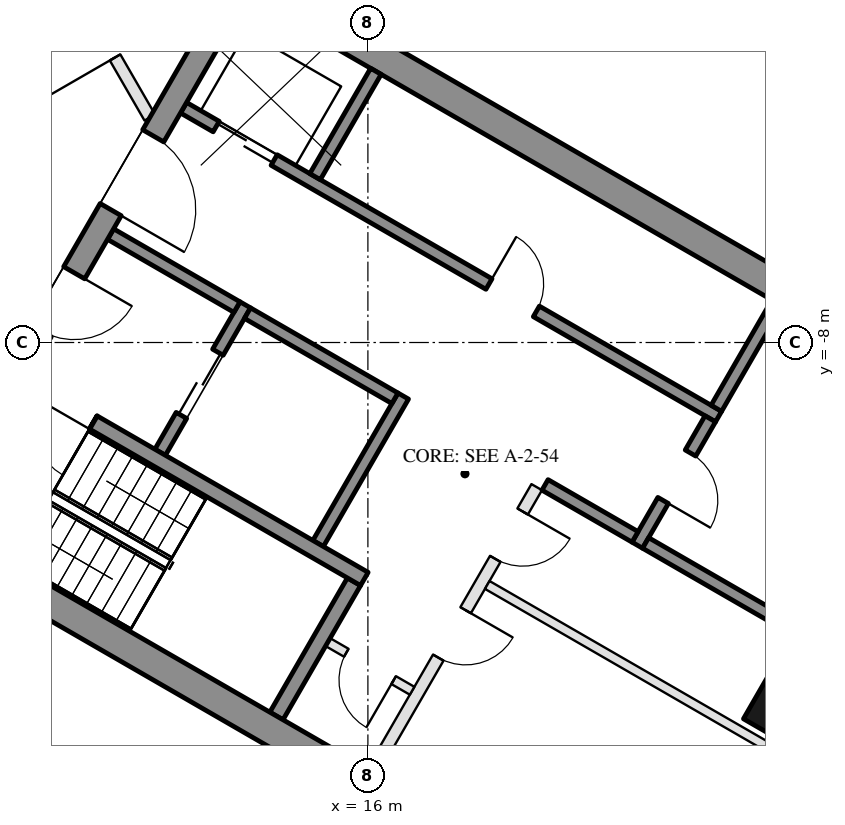
"""IFC4 building model, lengths in metres.
Left out: names, types, materials, properties, quantities, classifications, styles, units other than length and angle.
Written with IfcOpenShell. Run it as: python <this file> out.ifc"""

import sys

from ifc_helpers import new_model, si_unit, direction, frame, frame_2d, origin, origin_2d, place, context, subcontext, project, spatial, rectangle, hollow_rectangle, extrude, element, fill, save


model = new_model("IFC4")
c1 = context("Model", 3, precision=1e-05, world=origin(), true_north=direction((0.0, 1.0)))
c2 = subcontext(c1, "Body", "Model", "MODEL_VIEW")
j1 = project(units=[si_unit("LENGTHUNIT", "METRE"), si_unit("PLANEANGLEUNIT", "RADIAN")], contexts=[c1])
p1 = place(None, origin())
s1 = spatial("IfcSite", under=j1, at=p1, CompositionType="ELEMENT")
p2 = place(p1, origin())
s2 = spatial("IfcBuilding", under=s1, at=p2, CompositionType="ELEMENT")
p3 = place(p2, frame((0.0, 0.0, 231.7)))
s3 = spatial("IfcBuildingStorey", under=s2, at=p3, CompositionType="ELEMENT", Elevation=231.7)
p4 = place(p3, frame((23.729, -13.7, 0.0), z_axis=(0.0, 0.0, 1.0), x_axis=(0.5, 0.866025403784, 0.0)))
e1 = element("IfcColumn", 1, at=p4, inside=s3, PredefinedType="COLUMN", context=c2, shape_type="SweptSolid", body=[
    extrude(hollow_rectangle(XDim=2.4, YDim=2.2, WallThickness=0.06, at=origin_2d()), origin(), (0.0, 0.0, 1.0), 6.0),
])
p5 = place(p3, frame((13.797, -1.903, 0.0), z_axis=(0.0, 0.0, 1.0), x_axis=(0.866025009528, -0.500000682871, 0.0)))
e2 = element("IfcWall", 2, at=p5, inside=s3, PredefinedType="SHEAR", context=c2, shape_type="SweptSolid", body=[
    extrude(rectangle(XDim=14.837, YDim=0.5, at=frame_2d((7.418, 0.0))), origin(), (0.0, 0.0, 1.0), 5.7),
])
p6 = place(p3, frame((14.496, -14.143, 0.0), z_axis=(0.0, 0.0, 1.0), x_axis=(0.500062241894, 0.865989465428, 0.0)))
e3 = element("IfcWall", 3, at=p6, inside=s3, PredefinedType="SHEAR", context=c2, shape_type="SweptSolid", body=[
    extrude(rectangle(XDim=2.55, YDim=0.25, at=frame_2d((1.275, 0.0))), origin(), (0.0, 0.0, 1.0), 5.7),
])
p7 = place(p3, frame((15.181, -11.305, 0.0), z_axis=(0.0, 0.0, 1.0), x_axis=(0.49994636267, 0.866056369097, 0.0)))
e4 = element("IfcWall", 4, at=p7, inside=s3, PredefinedType="SHEAR", context=c2, shape_type="SweptSolid", body=[
    extrude(rectangle(XDim=2.8, YDim=0.2, at=frame_2d((1.4, 0.0))), origin(), (0.0, 0.0, 1.0), 5.7),
])
p8 = place(p3, frame((12.583, -9.805, 0.0), z_axis=(0.0, 0.0, 1.0), x_axis=(0.49994636267, 0.866056369097, 0.0)))
e5 = element("IfcWall", 5, at=p8, inside=s3, PredefinedType="SHEAR", context=c2, shape_type="SweptSolid", body=[
    extrude(rectangle(XDim=2.8, YDim=0.2, at=frame_2d((1.4, 0.0))), origin(), (0.0, 0.0, 1.0), 5.7),
])
p9 = place(p8, frame((0.7, 0.0, 0.0)))
e6 = element("IfcOpeningElement", 6, at=p9, cuts=e5, PredefinedType="OPENING", context=c2, shape_type="SweptSolid", body=[
    extrude(rectangle(XDim=1.2, YDim=2.1, at=frame_2d((0.6, 1.05))), frame((0.0, 0.11, 0.0), z_axis=(0.0, -1.0, 0.0), x_axis=(1.0, 0.0, 0.0)), (0.0, 0.0, 1.0), 0.22),
])
p10 = place(p3, frame((11.768, -6.217, 0.0), z_axis=(0.0, 0.0, 1.0), x_axis=(0.866050077142, -0.499957262057, 0.0)))
e7 = element("IfcWall", 7, at=p10, inside=s3, PredefinedType="SHEAR", context=c2, shape_type="SweptSolid", body=[
    extrude(rectangle(XDim=2.4, YDim=0.2, at=frame_2d((1.2, 0.0))), origin(), (0.0, 0.0, 1.0), 5.7),
])
p11 = place(p3, frame((14.02, -7.517, 0.0), z_axis=(0.0, 0.0, 1.0), x_axis=(0.866034573852, -0.49998411664, 0.0)))
e8 = element("IfcWall", 8, at=p11, inside=s3, PredefinedType="SHEAR", context=c2, shape_type="SweptSolid", body=[
    extrude(rectangle(XDim=2.8, YDim=0.2, at=frame_2d((1.4, 0.0))), origin(), (0.0, 0.0, 1.0), 5.7),
])
p12 = place(p3, frame((12.968, -4.138, 0.0), z_axis=(0.0, 0.0, 1.0), x_axis=(0.866028328073, -0.49999493495, 0.0)))
e9 = element("IfcWall", 9, at=p12, inside=s3, PredefinedType="SHEAR", context=c2, shape_type="SweptSolid", body=[
    extrude(rectangle(XDim=10.16, YDim=0.2, at=frame_2d((5.08, 0.0))), origin(), (0.0, 0.0, 1.0), 5.7),
])
p13 = place(p12, frame((0.62, 0.0, 0.0)))
e10 = element("IfcOpeningElement", 10, at=p13, cuts=e9, PredefinedType="OPENING", context=c2, shape_type="SweptSolid", body=[
    extrude(rectangle(XDim=1.1, YDim=2.1, at=frame_2d((0.55, 1.05))), frame((0.0, 0.11, 0.0), z_axis=(0.0, -1.0, 0.0), x_axis=(1.0, 0.0, 0.0)), (0.0, 0.0, 1.0), 0.22),
])
p14 = place(p12, frame((5.8, 0.0, 0.0)))
e11 = element("IfcOpeningElement", 11, at=p14, cuts=e9, PredefinedType="OPENING", context=c2, shape_type="SweptSolid", body=[
    extrude(rectangle(XDim=0.9, YDim=2.1, at=frame_2d((0.45, 1.05))), frame((0.0, 0.11, 0.0), z_axis=(0.0, -1.0, 0.0), x_axis=(1.0, 0.0, 0.0)), (0.0, 0.0, 1.0), 0.22),
])
p15 = place(p3, frame((20.43, -11.333, 0.0), z_axis=(0.0, 0.0, 1.0), x_axis=(0.500001309137, 0.866024647952, 0.0)))
e12 = element("IfcWall", 12, at=p15, inside=s3, PredefinedType="SHEAR", context=c2, shape_type="SweptSolid", body=[
    extrude(rectangle(XDim=2.4, YDim=0.2, at=frame_2d((1.2, 0.0))), origin(), (0.0, 0.0, 1.0), 5.7),
])
p16 = place(p15, frame((0.85, 0.0, 0.0)))
e13 = element("IfcOpeningElement", 13, at=p16, cuts=e12, PredefinedType="OPENING", context=c2, shape_type="SweptSolid", body=[
    extrude(rectangle(XDim=0.9, YDim=2.1, at=frame_2d((0.45, 1.05))), frame((0.0, 0.11, 0.0), z_axis=(0.0, -1.0, 0.0), x_axis=(1.0, 0.0, 0.0)), (0.0, 0.0, 1.0), 0.22),
])
p17 = place(p3, frame((18.913, -10.342, 0.0), z_axis=(0.0, 0.0, 1.0), x_axis=(0.866038183914, -0.499977863513, 0.0)))
e14 = element("IfcWall", 14, at=p17, inside=s3, PredefinedType="SHEAR", context=c2, shape_type="SweptSolid", body=[
    extrude(rectangle(XDim=1.71, YDim=0.2, at=frame_2d((0.855, 0.0))), origin(), (0.0, 0.0, 1.0), 5.7),
])
for number, where, z_axis, x_axis in (
    (15, (15.131, -5.272, 0.0), (0.0, 0.0, 1.0), (0.5, 0.866, 0.0)),
    (16, (21.73, -9.082, 0.0), (0.0, 0.0, 1.0), (0.5, 0.866, 0.0)),
):
    element("IfcWall", number, at=place(p3, frame(where, z_axis=z_axis, x_axis=x_axis)), inside=s3, PredefinedType="SHEAR", context=c2, shape_type="SweptSolid", body=[
        extrude(rectangle(XDim=2.0, YDim=0.2, at=frame_2d((1.0, 0.0))), origin(), (0.0, 0.0, 1.0), 5.7),
    ])
p18 = place(p3, frame((20.567, -11.297, 0.0), z_axis=(0.0, 0.0, 1.0), x_axis=(0.866055327414, -0.49994816717, 0.0)))
e17 = element("IfcWall", 17, at=p18, inside=s3, PredefinedType="SHEAR", context=c2, shape_type="SweptSolid", body=[
    extrude(rectangle(XDim=2.84, YDim=0.2, at=frame_2d((1.42, 0.0))), origin(), (0.0, 0.0, 1.0), 5.7),
])
p19 = place(p3, frame((16.076, -15.055, 0.0), z_axis=(0.0, 0.0, 1.0), x_axis=(0.499995103361, 0.866028230842, 0.0)))
e18 = element("IfcWall", 18, at=p19, inside=s3, PredefinedType="PARTITIONING", context=c2, shape_type="SweptSolid", body=[
    extrude(rectangle(XDim=5.4, YDim=0.2, at=frame_2d((2.7, 0.0))), origin(), (0.0, 0.0, 1.0), 5.7),
])
p20 = place(p19, frame((2.163, 0.0, 0.0)))
e19 = element("IfcOpeningElement", 19, at=p20, cuts=e18, PredefinedType="OPENING", context=c2, shape_type="SweptSolid", body=[
    extrude(rectangle(XDim=0.9, YDim=2.1, at=frame_2d((0.45, 1.05))), frame((0.0, 0.11, 0.0), z_axis=(0.0, -1.0, 0.0), x_axis=(1.0, 0.0, 0.0)), (0.0, 0.0, 1.0), 0.22),
])
p21 = place(p19, frame((4.038, 0.0, 0.0)))
e20 = element("IfcOpeningElement", 20, at=p21, cuts=e18, PredefinedType="OPENING", context=c2, shape_type="SweptSolid", body=[
    extrude(rectangle(XDim=0.9, YDim=2.1, at=frame_2d((0.45, 1.05))), frame((0.0, 0.11, 0.0), z_axis=(0.0, -1.0, 0.0), x_axis=(1.0, 0.0, 0.0)), (0.0, 0.0, 1.0), 0.22),
])
p22 = place(p3, frame((15.342, -12.928, 0.0), z_axis=(0.0, 0.0, 1.0), x_axis=(0.865989903783, -0.500061482766, 0.0)))
e21 = element("IfcWall", 21, at=p22, inside=s3, PredefinedType="PARTITIONING", context=c2, shape_type="SweptSolid", body=[
    extrude(rectangle(XDim=1.6, YDim=0.15, at=frame_2d((0.8, 0.0))), origin(), (0.0, 0.0, 1.0), 5.7),
])
p23 = place(p22, frame((0.35, 0.0, 0.0)))
e22 = element("IfcOpeningElement", 22, at=p23, cuts=e21, PredefinedType="OPENING", context=c2, shape_type="SweptSolid", body=[
    extrude(rectangle(XDim=0.9, YDim=2.1, at=frame_2d((0.45, 1.05))), frame((0.0, 0.085, 0.0), z_axis=(0.0, -1.0, 0.0), x_axis=(1.0, 0.0, 0.0)), (0.0, 0.0, 1.0), 0.17),
])
p24 = place(p3, frame((17.963, -11.987, 0.0), z_axis=(0.0, 0.0, 1.0), x_axis=(0.866016523273, -0.500015381182, 0.0)))
e23 = element("IfcWall", 23, at=p24, inside=s3, PredefinedType="PARTITIONING", context=c2, shape_type="SweptSolid", body=[
    extrude(rectangle(XDim=6.95, YDim=0.15, at=frame_2d((3.475, 0.0))), origin(), (0.0, 0.0, 1.0), 5.7),
])
p25 = place(p3, frame((10.024, -11.85, 0.0), z_axis=(0.0, 0.0, 1.0), x_axis=(0.86602396135, -0.500002498361, 0.0)))
e24 = element("IfcWall", 24, at=p25, inside=s3, PredefinedType="SHEAR", context=c2, shape_type="SweptSolid", body=[
    extrude(rectangle(XDim=13.131, YDim=0.5, at=frame_2d((6.565, 0.0))), origin(), (0.0, 0.0, 1.0), 5.7),
])
p26 = place(p3, frame((10.12, -8.672, 0.0), z_axis=(0.0, 0.0, 1.0), x_axis=(0.500008956979, 0.866020232408, 0.0)))
e25 = element("IfcWall", 25, at=p26, inside=s3, PredefinedType="SHEAR", context=c2, shape_type="SweptSolid", body=[
    extrude(rectangle(XDim=7.45, YDim=0.4, at=frame_2d((3.725, 0.0))), origin(), (0.0, 0.0, 1.0), 5.7),
])
p27 = place(p26, frame((1.0, 0.0, 0.0)))
e26 = element("IfcOpeningElement", 26, at=p27, cuts=e25, PredefinedType="OPENING", context=c2, shape_type="SweptSolid", body=[
    extrude(rectangle(XDim=1.1, YDim=2.1, at=frame_2d((0.55, 1.05))), frame((0.0, 0.21, 0.0), z_axis=(0.0, -1.0, 0.0), x_axis=(1.0, 0.0, 0.0)), (0.0, 0.0, 1.0), 0.42),
])
p28 = place(p26, frame((3.3, 0.0, 0.0)))
e27 = element("IfcOpeningElement", 27, at=p28, cuts=e25, PredefinedType="OPENING", context=c2, shape_type="SweptSolid", body=[
    extrude(rectangle(XDim=1.4, YDim=2.1, at=frame_2d((0.7, 1.05))), frame((0.0, 0.21, 0.0), z_axis=(0.0, -1.0, 0.0), x_axis=(1.0, 0.0, 0.0)), (0.0, 0.0, 1.0), 0.42),
])
p29 = place(p3, frame((10.356, -8.664, 0.0), z_axis=(0.0, 0.0, 1.0), x_axis=(0.866095317631, -0.499878886109, 0.0)))
e28 = element("IfcWall", 28, at=p29, inside=s3, PredefinedType="SHEAR", context=c2, shape_type="SweptSolid", body=[
    extrude(rectangle(XDim=1.306, YDim=0.25, at=frame_2d((0.653, 0.0))), origin(), (0.0, 0.0, 1.0), 5.7),
])
p30 = place(p29, frame((0.3, 0.0, 0.0)))
e29 = element("IfcOpeningElement", 29, at=p30, cuts=e28, PredefinedType="OPENING", context=c2, shape_type="SweptSolid", body=[
    extrude(rectangle(XDim=1.0, YDim=2.1, at=frame_2d((0.5, 1.05))), frame((0.0, 0.135, 0.0), z_axis=(0.0, -1.0, 0.0), x_axis=(1.0, 0.0, 0.0)), (0.0, 0.0, 1.0), 0.27),
])
p31 = place(p3, frame((11.487, -9.316, 0.0), z_axis=(0.0, 0.0, 1.0), x_axis=(0.866011695431, -0.500023742813, 0.0)))
e30 = element("IfcWall", 30, at=p31, inside=s3, PredefinedType="SHEAR", context=c2, shape_type="SweptSolid", body=[
    extrude(rectangle(XDim=5.144, YDim=0.25, at=frame_2d((2.572, 0.0))), origin(), (0.0, 0.0, 1.0), 5.7),
])
p32 = place(p3, frame((12.413, -4.3, 0.0), z_axis=(0.0, 0.0, 1.0), x_axis=(-0.50000478328, 0.866022642139, 0.0)))
e31 = element("IfcWall", 31, at=p32, inside=s3, PredefinedType="PARTITIONING", context=c2, shape_type="SweptSolid", body=[
    extrude(rectangle(XDim=19.861, YDim=0.2, at=frame_2d((9.931, 0.0))), origin(), (0.0, 0.0, 1.0), 4.91),
])
p33 = place(p32, frame((1.142, 0.0, 0.0)))
e32 = element("IfcOpeningElement", 32, at=p33, cuts=e31, PredefinedType="OPENING", context=c2, shape_type="SweptSolid", body=[
    extrude(rectangle(XDim=1.8, YDim=2.4, at=frame_2d((0.9, 1.2))), frame((0.0, 0.11, 0.0), z_axis=(0.0, -1.0, 0.0), x_axis=(1.0, 0.0, 0.0)), (0.0, 0.0, 1.0), 0.22),
])
p34 = place(p32, frame((4.325, 0.0, 0.0)))
e33 = element("IfcOpeningElement", 33, at=p34, cuts=e31, PredefinedType="OPENING", context=c2, shape_type="SweptSolid", body=[
    extrude(rectangle(XDim=1.8, YDim=2.4, at=frame_2d((0.9, 1.2))), frame((0.0, 0.11, 0.0), z_axis=(0.0, -1.0, 0.0), x_axis=(1.0, 0.0, 0.0)), (0.0, 0.0, 1.0), 0.22),
])
p35 = place(p32, frame((9.536, 0.0, 0.0)))
e34 = element("IfcOpeningElement", 34, at=p35, cuts=e31, PredefinedType="OPENING", context=c2, shape_type="SweptSolid", body=[
    extrude(rectangle(XDim=1.2, YDim=2.1, at=frame_2d((0.6, 1.05))), frame((0.0, 0.11, 0.0), z_axis=(0.0, -1.0, 0.0), x_axis=(1.0, 0.0, 0.0)), (0.0, 0.0, 1.0), 0.22),
])
p36 = place(p32, frame((16.019, 0.0, 0.0)))
e35 = element("IfcOpeningElement", 35, at=p36, cuts=e31, PredefinedType="OPENING", context=c2, shape_type="SweptSolid", body=[
    extrude(rectangle(XDim=1.2, YDim=2.1, at=frame_2d((0.6, 1.05))), frame((0.0, 0.11, 0.0), z_axis=(0.0, -1.0, 0.0), x_axis=(1.0, 0.0, 0.0)), (0.0, 0.0, 1.0), 0.22),
])
p37 = place(p9, origin())
e36 = element("IfcDoor", 36, at=p37, inside=s3, OperationType="DOUBLE_DOOR_SLIDING", PredefinedType="DOOR", context=c2, shape_type="SweptSolid", body=[
    extrude(rectangle(XDim=1.2, YDim=2.1, at=frame_2d((0.6, 1.05))), frame((0.0, 0.025, 0.0), z_axis=(0.0, -1.0, 0.0), x_axis=(1.0, 0.0, 0.0)), (0.0, 0.0, 1.0), 0.05),
])
fill(e6, e36)
p38 = place(p23, frame((0.9, 0.0, 0.0), z_axis=(0.0, 0.0, 1.0), x_axis=(-1.0, 0.0, 0.0)))
e37 = element("IfcDoor", 37, at=p38, inside=s3, OperationType="SINGLE_SWING_LEFT", PredefinedType="DOOR", context=c2, shape_type="SweptSolid", body=[
    extrude(rectangle(XDim=0.9, YDim=2.1, at=frame_2d((0.45, 1.05))), frame((0.0, 0.025, 0.0), z_axis=(0.0, -1.0, 0.0), x_axis=(1.0, 0.0, 0.0)), (0.0, 0.0, 1.0), 0.05),
])
fill(e22, e37)
p39 = place(p13, origin())
e38 = element("IfcDoor", 38, at=p39, inside=s3, OperationType="DOUBLE_DOOR_SLIDING", PredefinedType="DOOR", context=c2, shape_type="SweptSolid", body=[
    extrude(rectangle(XDim=1.1, YDim=2.1, at=frame_2d((0.55, 1.05))), frame((0.0, 0.025, 0.0), z_axis=(0.0, -1.0, 0.0), x_axis=(1.0, 0.0, 0.0)), (0.0, 0.0, 1.0), 0.05),
])
fill(e10, e38)
p40 = place(p14, origin())
e39 = element("IfcDoor", 39, at=p40, inside=s3, OperationType="SINGLE_SWING_LEFT", PredefinedType="DOOR", context=c2, shape_type="SweptSolid", body=[
    extrude(rectangle(XDim=0.9, YDim=2.1, at=frame_2d((0.45, 1.05))), frame((0.0, 0.025, 0.0), z_axis=(0.0, -1.0, 0.0), x_axis=(1.0, 0.0, 0.0)), (0.0, 0.0, 1.0), 0.05),
])
fill(e11, e39)
p41 = place(p16, frame((0.9, 0.0, 0.0), z_axis=(0.0, 0.0, 1.0), x_axis=(-1.0, 0.0, 0.0)))
e40 = element("IfcDoor", 40, at=p41, inside=s3, OperationType="SINGLE_SWING_RIGHT", PredefinedType="DOOR", context=c2, shape_type="SweptSolid", body=[
    extrude(rectangle(XDim=0.9, YDim=2.1, at=frame_2d((0.45, 1.05))), frame((0.0, 0.025, 0.0), z_axis=(0.0, -1.0, 0.0), x_axis=(1.0, 0.0, 0.0)), (0.0, 0.0, 1.0), 0.05),
])
fill(e13, e40)
p42 = place(p20, frame((0.9, 0.0, 0.0), z_axis=(0.0, 0.0, 1.0), x_axis=(-1.0, 0.0, 0.0)))
e41 = element("IfcDoor", 41, at=p42, inside=s3, OperationType="SINGLE_SWING_LEFT", PredefinedType="DOOR", context=c2, shape_type="SweptSolid", body=[
    extrude(rectangle(XDim=0.9, YDim=2.1, at=frame_2d((0.45, 1.05))), frame((0.0, 0.025, 0.0), z_axis=(0.0, -1.0, 0.0), x_axis=(1.0, 0.0, 0.0)), (0.0, 0.0, 1.0), 0.05),
])
fill(e19, e41)
p43 = place(p21, frame((0.9, 0.0, 0.0), z_axis=(0.0, 0.0, 1.0), x_axis=(-1.0, 0.0, 0.0)))
e42 = element("IfcDoor", 42, at=p43, inside=s3, OperationType="SINGLE_SWING_LEFT", PredefinedType="DOOR", context=c2, shape_type="SweptSolid", body=[
    extrude(rectangle(XDim=0.9, YDim=2.1, at=frame_2d((0.45, 1.05))), frame((0.0, 0.025, 0.0), z_axis=(0.0, -1.0, 0.0), x_axis=(1.0, 0.0, 0.0)), (0.0, 0.0, 1.0), 0.05),
])
fill(e20, e42)
p44 = place(p27, frame((1.1, 0.0, 0.0), z_axis=(0.0, 0.0, 1.0), x_axis=(-1.0, 0.0, 0.0)))
e43 = element("IfcDoor", 43, at=p44, inside=s3, OperationType="SINGLE_SWING_LEFT", PredefinedType="DOOR", context=c2, shape_type="SweptSolid", body=[
    extrude(rectangle(XDim=1.1, YDim=2.1, at=frame_2d((0.55, 1.05))), frame((0.0, 0.025, 0.0), z_axis=(0.0, -1.0, 0.0), x_axis=(1.0, 0.0, 0.0)), (0.0, 0.0, 1.0), 0.05),
])
fill(e26, e43)
p45 = place(p28, frame((1.4, 0.0, 0.0), z_axis=(0.0, 0.0, 1.0), x_axis=(-1.0, 0.0, 0.0)))
e44 = element("IfcDoor", 44, at=p45, inside=s3, OperationType="DOUBLE_DOOR_SINGLE_SWING", PredefinedType="DOOR", context=c2, shape_type="SweptSolid", body=[
    extrude(rectangle(XDim=1.4, YDim=2.1, at=frame_2d((0.7, 1.05))), frame((0.0, 0.025, 0.0), z_axis=(0.0, -1.0, 0.0), x_axis=(1.0, 0.0, 0.0)), (0.0, 0.0, 1.0), 0.05),
])
fill(e27, e44)
p46 = place(p30, frame((1.0, 0.0, 0.0), z_axis=(0.0, 0.0, 1.0), x_axis=(-1.0, 0.0, 0.0)))
e45 = element("IfcDoor", 45, at=p46, inside=s3, OperationType="SINGLE_SWING_LEFT", PredefinedType="DOOR", context=c2, shape_type="SweptSolid", body=[
    extrude(rectangle(XDim=1.0, YDim=2.1, at=frame_2d((0.5, 1.05))), frame((0.0, 0.025, 0.0), z_axis=(0.0, -1.0, 0.0), x_axis=(1.0, 0.0, 0.0)), (0.0, 0.0, 1.0), 0.05),
])
fill(e29, e45)
p47 = place(p33, origin())
e46 = element("IfcDoor", 46, at=p47, inside=s3, OperationType="DOUBLE_DOOR_SINGLE_SWING", PredefinedType="DOOR", context=c2, shape_type="SweptSolid", body=[
    extrude(rectangle(XDim=1.8, YDim=2.4, at=frame_2d((0.9, 1.2))), frame((0.0, 0.025, 0.0), z_axis=(0.0, -1.0, 0.0), x_axis=(1.0, 0.0, 0.0)), (0.0, 0.0, 1.0), 0.05),
])
fill(e32, e46)
save(model, sys.argv[1])
